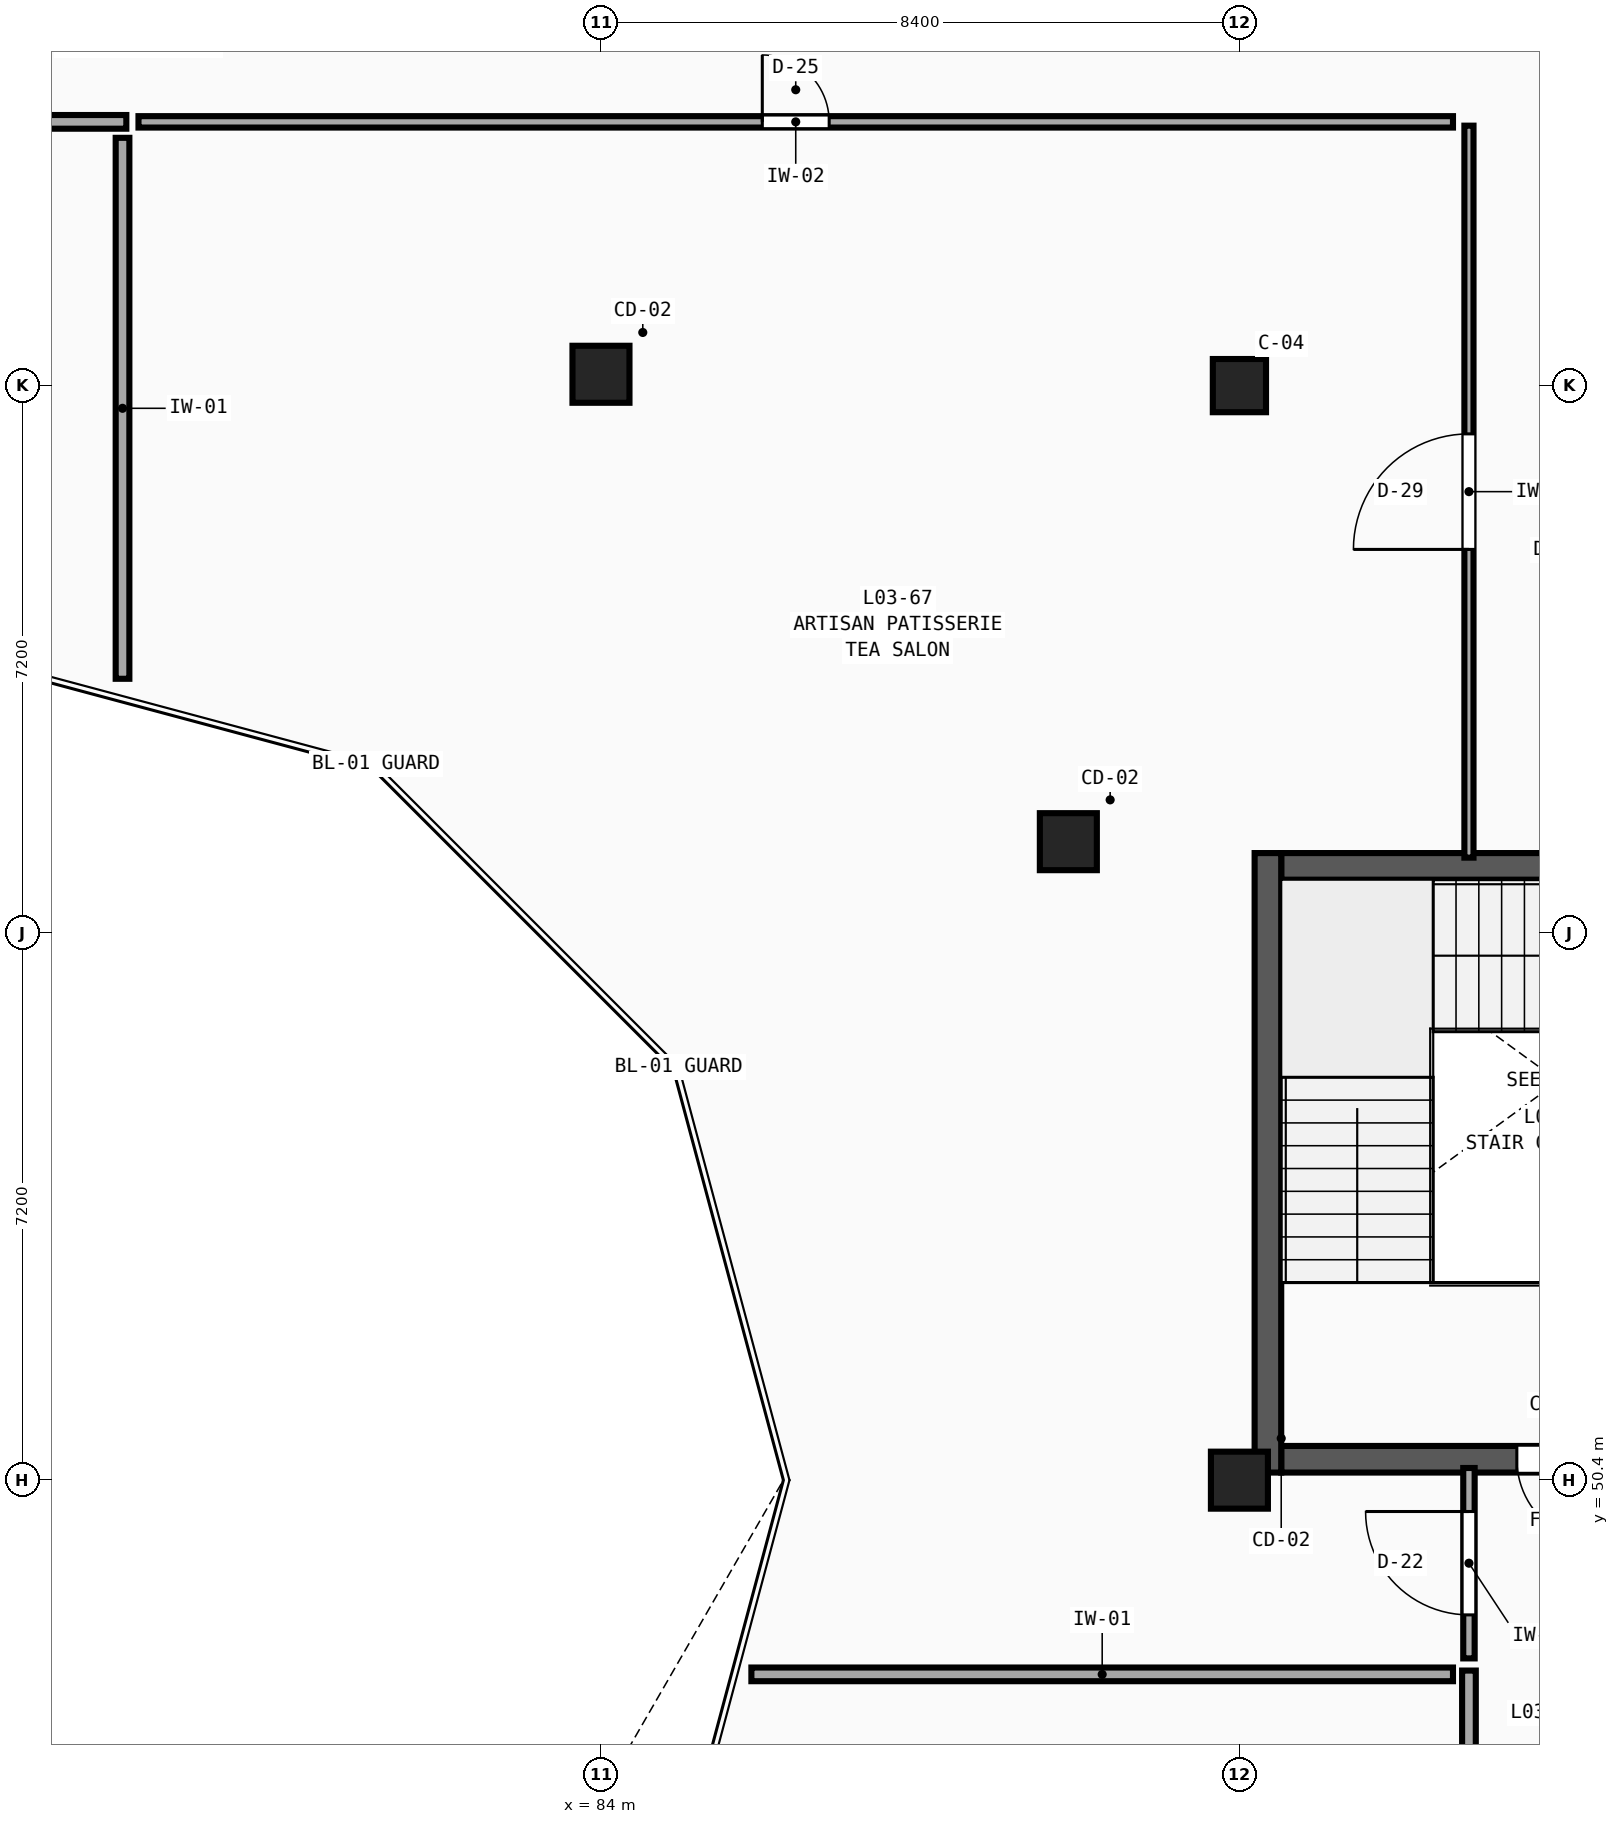
"""IFC4 building model, lengths in metres.
Left out: names, types, materials, properties, quantities, classifications, styles, units other than length and angle.
Written with IfcOpenShell. Run it as: python <this file> out.ifc"""

import sys

from ifc_helpers import new_model, si_unit, direction, frame, frame_2d, origin, origin_2d, place, context, subcontext, project, spatial, rectangle, circle, extrude, element, fill, save


model = new_model("IFC4")
c1 = context("Model", 3, precision=1e-05, world=origin(), true_north=direction((0.0, 1.0)))
c2 = subcontext(c1, "Body", "Model", "MODEL_VIEW")
j1 = project(units=[si_unit("LENGTHUNIT", "METRE"), si_unit("PLANEANGLEUNIT", "RADIAN")], contexts=[c1])
p1 = place(None, origin())
s1 = spatial("IfcSite", under=j1, at=p1, CompositionType="ELEMENT")
p2 = place(p1, origin())
s2 = spatial("IfcBuilding", under=s1, at=p2, CompositionType="ELEMENT")
p3 = place(p2, frame((0.0, 0.0, 14.4)))
s3 = spatial("IfcBuildingStorey", under=s2, at=p3, CompositionType="ELEMENT", Elevation=14.4)
p4 = place(p3, frame((92.4, 64.8, 0.0), z_axis=(0.0, 0.0, 1.0), x_axis=(1.0, 0.0, 0.0)))
e1 = element("IfcColumn", 1, at=p4, inside=s3, PredefinedType="COLUMN", context=c2, shape_type="SweptSolid", body=[
    extrude(rectangle(XDim=0.7, YDim=0.7, at=origin_2d()), origin(), (0.0, 0.0, 1.0), 4.5),
])
for number, where, z_axis, x_axis in (
    (2, (92.4, 50.4, 0.0), (0.0, 0.0, 1.0), (1.0, 0.0, 0.0)),
    (3, (90.149, 58.8, 0.0), (0.0, 0.0, 1.0), (1.0, 0.0, 0.0)),
    (4, (84.0, 64.949, 0.0), (0.0, 0.0, 1.0), (1.0, 0.0, 0.0)),
):
    element("IfcColumn", number, at=place(p3, frame(where, z_axis=z_axis, x_axis=x_axis)), inside=s3, PredefinedType="COLUMN", context=c2, shape_type="SweptSolid", body=[
        extrude(circle(Radius=0.375, at=origin_2d()), origin(), (0.0, 0.0, 1.0), 4.5),
    ])
p5 = place(p3, frame((100.25, 50.675, 0.0), z_axis=(0.0, 0.0, 1.0), x_axis=(-1.0, 0.0, 0.0)))
e5 = element("IfcWall", 5, at=p5, inside=s3, PredefinedType="SHEAR", context=c2, shape_type="SweptSolid", body=[
    extrude(rectangle(XDim=7.3, YDim=0.35, at=frame_2d((3.65, 0.0))), origin(), (0.0, 0.0, 1.0), 4.5),
])
p6 = place(p5, frame((3.1, 0.0, 0.0)))
e6 = element("IfcOpeningElement", 6, at=p6, cuts=e5, PredefinedType="OPENING", context=c2, shape_type="SweptSolid", body=[
    extrude(rectangle(XDim=1.1, YDim=2.2, at=frame_2d((0.55, 1.1))), frame((0.0, 0.195, 0.0), z_axis=(0.0, -1.0, 0.0), x_axis=(1.0, 0.0, 0.0)), (0.0, 0.0, 1.0), 0.39),
])
p7 = place(p3, frame((92.95, 58.475, 0.0), z_axis=(0.0, 0.0, 1.0), x_axis=(1.0, 0.0, 0.0)))
e7 = element("IfcWall", 7, at=p7, inside=s3, PredefinedType="SHEAR", context=c2, shape_type="SweptSolid", body=[
    extrude(rectangle(XDim=7.3, YDim=0.35, at=frame_2d((3.65, 0.0))), origin(), (0.0, 0.0, 1.0), 4.5),
])
p8 = place(p3, frame((92.775, 58.65, 0.0), z_axis=(0.0, 0.0, 1.0), x_axis=(0.0, -1.0, 0.0)))
e8 = element("IfcWall", 8, at=p8, inside=s3, PredefinedType="SHEAR", context=c2, shape_type="SweptSolid", body=[
    extrude(rectangle(XDim=8.15, YDim=0.35, at=frame_2d((4.075, 0.0))), origin(), (0.0, 0.0, 1.0), 4.5),
])
p9 = place(p3, frame((55.68, 68.27, 0.0), z_axis=(0.0, 0.0, 1.0), x_axis=(1.0, 0.0, 0.0)))
e9 = element("IfcWall", 9, at=p9, inside=s3, PredefinedType="PARTITIONING", context=c2, shape_type="SweptSolid", body=[
    extrude(rectangle(XDim=22.075, YDim=0.18, at=frame_2d((11.038, 0.0))), origin(), (0.0, 0.0, 1.0), 4.18),
])
p10 = place(p9, frame((10.198, 0.0, 0.0)))
e10 = element("IfcOpeningElement", 10, at=p10, cuts=e9, PredefinedType="OPENING", context=c2, shape_type="SweptSolid", body=[
    extrude(rectangle(XDim=1.68, YDim=2.13, at=frame_2d((0.84, 1.065))), frame((0.0, 0.11, 0.0), z_axis=(0.0, -1.0, 0.0), x_axis=(1.0, 0.0, 0.0)), (0.0, 0.0, 1.0), 0.22),
])
p11 = place(p3, frame((77.915, 68.27, 0.0), z_axis=(0.0, 0.0, 1.0), x_axis=(1.0, 0.0, 0.0)))
e11 = element("IfcWall", 11, at=p11, inside=s3, PredefinedType="PARTITIONING", context=c2, shape_type="SweptSolid", body=[
    extrude(rectangle(XDim=17.295, YDim=0.15, at=frame_2d((8.647, 0.0))), origin(), (0.0, 0.0, 1.0), 4.18),
])
p12 = place(p11, frame((8.208, 0.0, 0.0)))
e12 = element("IfcOpeningElement", 12, at=p12, cuts=e11, PredefinedType="OPENING", context=c2, shape_type="SweptSolid", body=[
    extrude(rectangle(XDim=0.88, YDim=2.37, at=frame_2d((0.44, 1.185))), frame((0.0, 0.095, 0.0), z_axis=(0.0, -1.0, 0.0), x_axis=(1.0, 0.0, 0.0)), (0.0, 0.0, 1.0), 0.19),
])
p13 = place(p3, frame((95.42, 36.37, 0.0), z_axis=(0.0, 0.0, 1.0), x_axis=(0.0, 1.0, 0.0)))
e13 = element("IfcWall", 13, at=p13, inside=s3, PredefinedType="PARTITIONING", context=c2, shape_type="SweptSolid", body=[
    extrude(rectangle(XDim=11.525, YDim=0.18, at=frame_2d((5.762, 0.0))), origin(), (0.0, 0.0, 1.0), 4.18),
])
p14 = place(p13, frame((4.923, 0.0, 0.0)))
e14 = element("IfcOpeningElement", 14, at=p14, cuts=e13, PredefinedType="OPENING", context=c2, shape_type="SweptSolid", body=[
    extrude(rectangle(XDim=1.68, YDim=2.13, at=frame_2d((0.84, 1.065))), frame((0.0, 0.11, 0.0), z_axis=(0.0, -1.0, 0.0), x_axis=(1.0, 0.0, 0.0)), (0.0, 0.0, 1.0), 0.22),
])
p15 = place(p3, frame((95.42, 58.59, 0.0), z_axis=(0.0, 0.0, 1.0), x_axis=(0.0, 1.0, 0.0)))
e15 = element("IfcWall", 15, at=p15, inside=s3, PredefinedType="PARTITIONING", context=c2, shape_type="SweptSolid", body=[
    extrude(rectangle(XDim=9.63, YDim=0.12, at=frame_2d((4.815, 0.0))), origin(), (0.0, 0.0, 1.0), 4.18),
])
p16 = place(p15, frame((4.055, 0.0, 0.0)))
e16 = element("IfcOpeningElement", 16, at=p16, cuts=e15, PredefinedType="OPENING", context=c2, shape_type="SweptSolid", body=[
    extrude(rectangle(XDim=1.52, YDim=2.37, at=frame_2d((0.76, 1.185))), frame((0.0, 0.08, 0.0), z_axis=(0.0, -1.0, 0.0), x_axis=(1.0, 0.0, 0.0)), (0.0, 0.0, 1.0), 0.16),
])
p17 = place(p3, frame((95.42, 48.055, 0.0), z_axis=(0.0, 0.0, 1.0), x_axis=(0.0, 1.0, 0.0)))
e17 = element("IfcWall", 17, at=p17, inside=s3, PredefinedType="PARTITIONING", context=c2, shape_type="SweptSolid", body=[
    extrude(rectangle(XDim=2.505, YDim=0.15, at=frame_2d((1.252, 0.0))), origin(), (0.0, 0.0, 1.0), 4.18),
])
p18 = place(p17, frame((0.573, 0.0, 0.0)))
e18 = element("IfcOpeningElement", 18, at=p18, cuts=e17, PredefinedType="OPENING", context=c2, shape_type="SweptSolid", body=[
    extrude(rectangle(XDim=1.36, YDim=2.29, at=frame_2d((0.68, 1.145))), frame((0.0, 0.095, 0.0), z_axis=(0.0, -1.0, 0.0), x_axis=(1.0, 0.0, 0.0)), (0.0, 0.0, 1.0), 0.19),
])
p19 = place(p3, frame((85.979, 47.845, 0.0), z_axis=(0.0, 0.0, 1.0), x_axis=(1.0, 0.0, 0.0)))
e19 = element("IfcWall", 19, at=p19, inside=s3, PredefinedType="PARTITIONING", context=c2, shape_type="SweptSolid", body=[
    extrude(rectangle(XDim=9.231, YDim=0.18, at=frame_2d((4.615, 0.0))), origin(), (0.0, 0.0, 1.0), 4.18),
])
p20 = place(p3, frame((77.705, 60.943, 0.0), z_axis=(0.0, 0.0, 1.0), x_axis=(0.0, 1.0, 0.0)))
e20 = element("IfcWall", 20, at=p20, inside=s3, PredefinedType="PARTITIONING", context=c2, shape_type="SweptSolid", body=[
    extrude(rectangle(XDim=7.117, YDim=0.18, at=frame_2d((3.559, 0.0))), origin(), (0.0, 0.0, 1.0), 4.18),
])
p21 = place(p6, origin())
e21 = element("IfcDoor", 21, at=p21, inside=s3, OperationType="SINGLE_SWING_LEFT", PredefinedType="DOOR", context=c2, shape_type="SweptSolid", body=[
    extrude(rectangle(XDim=1.1, YDim=2.2, at=frame_2d((0.55, 1.1))), frame((0.0, 0.025, 0.0), z_axis=(0.0, -1.0, 0.0), x_axis=(1.0, 0.0, 0.0)), (0.0, 0.0, 1.0), 0.05),
])
fill(e6, e21)
p22 = place(p12, origin())
e22 = element("IfcDoor", 22, at=p22, inside=s3, OperationType="SINGLE_SWING_LEFT", PredefinedType="DOOR", context=c2, shape_type="SweptSolid", body=[
    extrude(rectangle(XDim=0.88, YDim=2.37, at=frame_2d((0.44, 1.185))), frame((0.0, 0.025, 0.0), z_axis=(0.0, -1.0, 0.0), x_axis=(1.0, 0.0, 0.0)), (0.0, 0.0, 1.0), 0.05),
])
fill(e12, e22)
p23 = place(p16, origin())
e23 = element("IfcDoor", 23, at=p23, inside=s3, OperationType="SINGLE_SWING_LEFT", PredefinedType="DOOR", context=c2, shape_type="SweptSolid", body=[
    extrude(rectangle(XDim=1.52, YDim=2.37, at=frame_2d((0.76, 1.185))), frame((0.0, 0.025, 0.0), z_axis=(0.0, -1.0, 0.0), x_axis=(1.0, 0.0, 0.0)), (0.0, 0.0, 1.0), 0.05),
])
fill(e16, e23)
p24 = place(p18, origin())
e24 = element("IfcDoor", 24, at=p24, inside=s3, OperationType="SINGLE_SWING_RIGHT", PredefinedType="DOOR", context=c2, shape_type="SweptSolid", body=[
    extrude(rectangle(XDim=1.36, YDim=2.29, at=frame_2d((0.68, 1.145))), frame((0.0, 0.025, 0.0), z_axis=(0.0, -1.0, 0.0), x_axis=(1.0, 0.0, 0.0)), (0.0, 0.0, 1.0), 0.05),
])
fill(e18, e24)
save(model, sys.argv[1])
